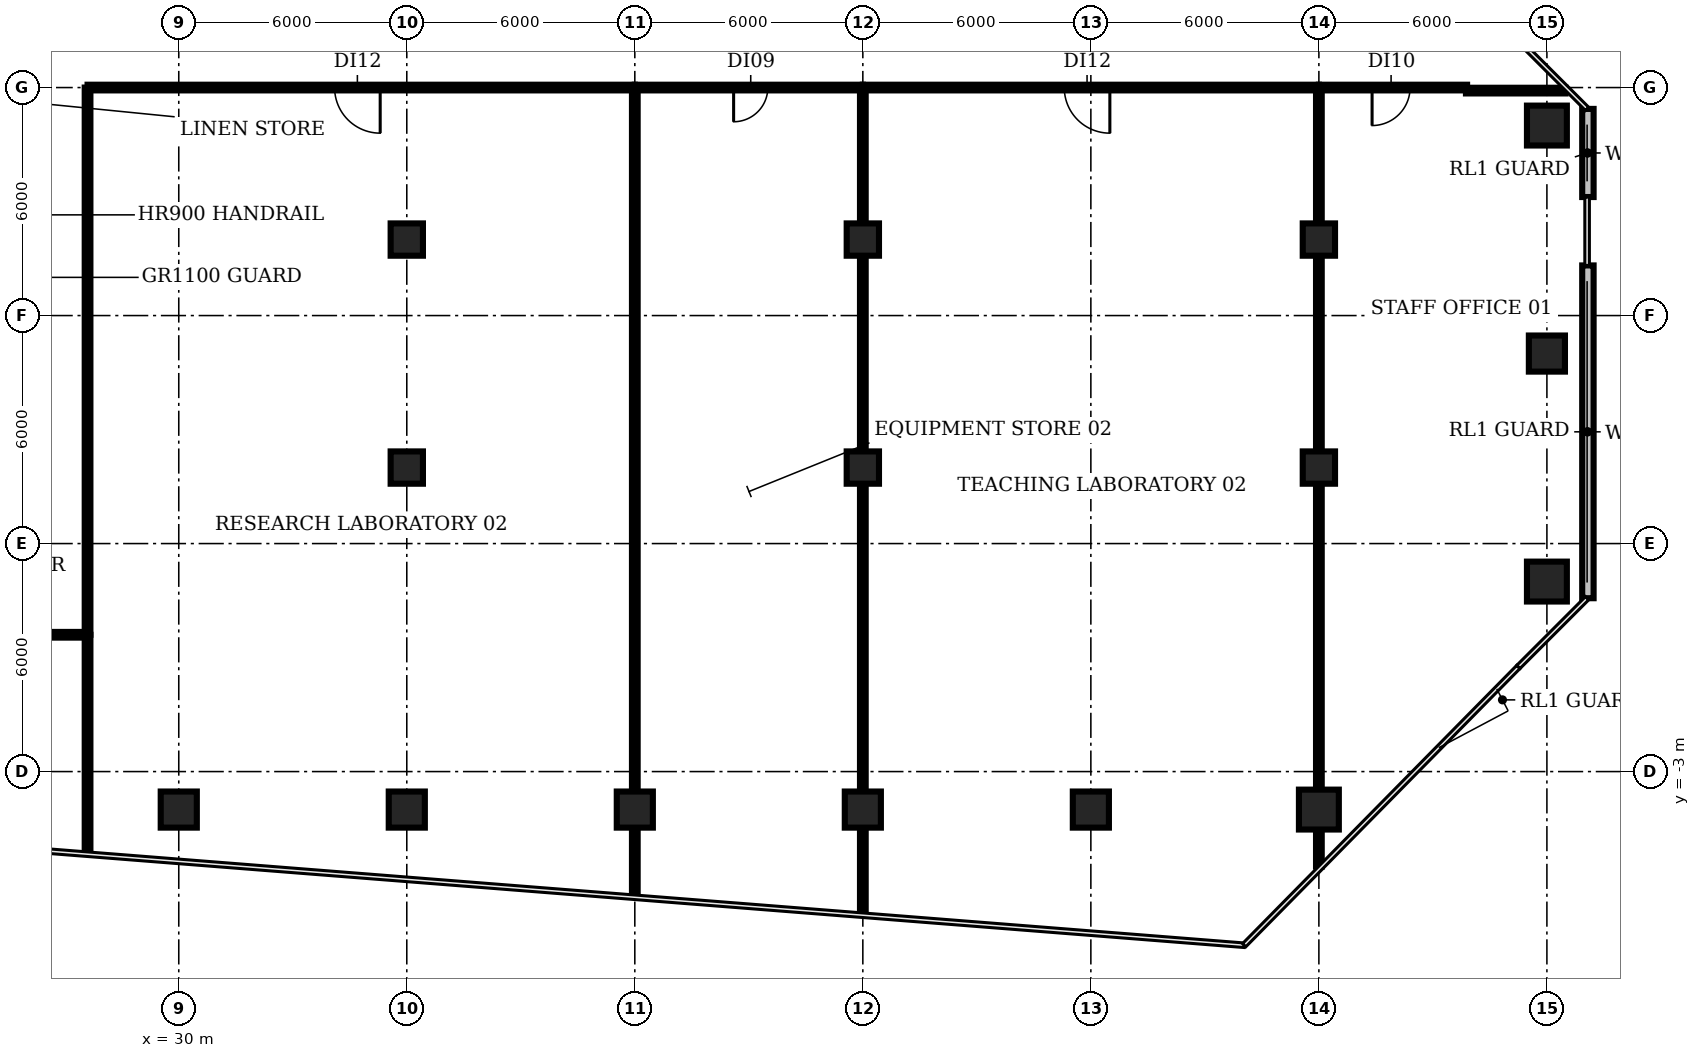
"""IFC4 building model, lengths in metres.
Left out: names, types, materials, properties, quantities, classifications, styles, units other than length and angle.
Written with IfcOpenShell. Run it as: python <this file> out.ifc"""

import sys

from ifc_helpers import new_model, si_unit, direction, frame, frame_2d, origin, origin_2d, place, context, subcontext, project, spatial, rectangle, circle, extrude, element, fill, save


model = new_model("IFC4")
c1 = context("Model", 3, precision=1e-05, world=origin(), true_north=direction((0.0, 1.0)))
c2 = subcontext(c1, "Body", "Model", "MODEL_VIEW")
j1 = project(units=[si_unit("LENGTHUNIT", "METRE"), si_unit("PLANEANGLEUNIT", "RADIAN")], contexts=[c1])
p1 = place(None, origin())
s1 = spatial("IfcSite", under=j1, at=p1, CompositionType="ELEMENT")
p2 = place(p1, origin())
s2 = spatial("IfcBuilding", under=s1, at=p2, CompositionType="ELEMENT")
p3 = place(p2, frame((0.0, 0.0, 33.2)))
s3 = spatial("IfcBuildingStorey", under=s2, at=p3, CompositionType="ELEMENT", Elevation=33.2)
for number, where, z_axis, x_axis in (
    (1, (30.0, -4.0, 0.0), (0.0, 0.0, 1.0), (1.0, 0.0, 0.0)),
    (2, (36.0, -4.0, 0.0), (0.0, 0.0, 1.0), (1.0, 0.0, 0.0)),
):
    element("IfcColumn", number, at=place(p3, frame(where, z_axis=z_axis, x_axis=x_axis)), inside=s3, PredefinedType="COLUMN", context=c2, shape_type="SweptSolid", body=[
        extrude(rectangle(XDim=0.95, YDim=0.95, at=origin_2d()), origin(), (0.0, 0.0, 1.0), 3.85),
    ])
for number, where, z_axis, x_axis in (
    (3, (36.0, 5.0, 0.0), (0.0, 0.0, 1.0), (1.0, 0.0, 0.0)),
    (4, (36.0, 11.0, 0.0), (0.0, 0.0, 1.0), (1.0, 0.0, 0.0)),
):
    element("IfcColumn", number, at=place(p3, frame(where, z_axis=z_axis, x_axis=x_axis)), inside=s3, PredefinedType="COLUMN", context=c2, shape_type="SweptSolid", body=[
        extrude(rectangle(XDim=0.85, YDim=0.85, at=origin_2d()), origin(), (0.0, 0.0, 1.0), 3.85),
    ])
for number, where, z_axis, x_axis in (
    (5, (42.0, -4.0, 0.0), (0.0, 0.0, 1.0), (1.0, 0.0, 0.0)),
    (6, (48.0, -4.0, 0.0), (0.0, 0.0, 1.0), (1.0, 0.0, 0.0)),
):
    element("IfcColumn", number, at=place(p3, frame(where, z_axis=z_axis, x_axis=x_axis)), inside=s3, PredefinedType="COLUMN", context=c2, shape_type="SweptSolid", body=[
        extrude(rectangle(XDim=0.95, YDim=0.95, at=origin_2d()), origin(), (0.0, 0.0, 1.0), 3.85),
    ])
for number, where, z_axis, x_axis in (
    (7, (48.0, 5.0, 0.0), (0.0, 0.0, 1.0), (1.0, 0.0, 0.0)),
    (8, (48.0, 11.0, 0.0), (0.0, 0.0, 1.0), (1.0, 0.0, 0.0)),
):
    element("IfcColumn", number, at=place(p3, frame(where, z_axis=z_axis, x_axis=x_axis)), inside=s3, PredefinedType="COLUMN", context=c2, shape_type="SweptSolid", body=[
        extrude(rectangle(XDim=0.85, YDim=0.85, at=origin_2d()), origin(), (0.0, 0.0, 1.0), 3.85),
    ])
p4 = place(p3, frame((54.0, -4.0, 0.0), z_axis=(0.0, 0.0, 1.0), x_axis=(1.0, 0.0, 0.0)))
e9 = element("IfcColumn", 9, at=p4, inside=s3, PredefinedType="COLUMN", context=c2, shape_type="SweptSolid", body=[
    extrude(rectangle(XDim=0.95, YDim=0.95, at=origin_2d()), origin(), (0.0, 0.0, 1.0), 3.85),
])
p5 = place(p3, frame((60.0, -4.0, 0.0), z_axis=(0.0, 0.0, 1.0), x_axis=(1.0, 0.0, 0.0)))
e10 = element("IfcColumn", 10, at=p5, inside=s3, PredefinedType="COLUMN", context=c2, shape_type="SweptSolid", body=[
    extrude(circle(Radius=0.525, at=origin_2d()), origin(), (0.0, 0.0, 1.0), 3.85),
])
for number, where, z_axis, x_axis in (
    (11, (60.0, 5.0, 0.0), (0.0, 0.0, 1.0), (1.0, 0.0, 0.0)),
    (12, (60.0, 11.0, 0.0), (0.0, 0.0, 1.0), (1.0, 0.0, 0.0)),
):
    element("IfcColumn", number, at=place(p3, frame(where, z_axis=z_axis, x_axis=x_axis)), inside=s3, PredefinedType="COLUMN", context=c2, shape_type="SweptSolid", body=[
        extrude(rectangle(XDim=0.85, YDim=0.85, at=origin_2d()), origin(), (0.0, 0.0, 1.0), 3.85),
    ])
p6 = place(p3, frame((66.0, 2.0, 0.0), z_axis=(0.0, 0.0, 1.0), x_axis=(1.0, 0.0, 0.0)))
e13 = element("IfcColumn", 13, at=p6, inside=s3, PredefinedType="COLUMN", context=c2, shape_type="SweptSolid", body=[
    extrude(circle(Radius=0.525, at=origin_2d()), origin(), (0.0, 0.0, 1.0), 3.85),
])
p7 = place(p3, frame((66.0, 8.0, 0.0), z_axis=(0.0, 0.0, 1.0), x_axis=(1.0, 0.0, 0.0)))
e14 = element("IfcColumn", 14, at=p7, inside=s3, PredefinedType="COLUMN", context=c2, shape_type="SweptSolid", body=[
    extrude(rectangle(XDim=0.95, YDim=0.95, at=origin_2d()), origin(), (0.0, 0.0, 1.0), 3.85),
])
p8 = place(p3, frame((66.0, 14.0, 0.0), z_axis=(0.0, 0.0, 1.0), x_axis=(1.0, 0.0, 0.0)))
e15 = element("IfcColumn", 15, at=p8, inside=s3, PredefinedType="COLUMN", context=c2, shape_type="SweptSolid", body=[
    extrude(circle(Radius=0.525, at=origin_2d()), origin(), (0.0, 0.0, 1.0), 3.85),
])
p9 = place(p3, frame((67.079, 1.562, 0.0), z_axis=(0.0, 0.0, 1.0), x_axis=(0.0, 1.0, 0.0)))
e16 = element("IfcWall", 16, at=p9, inside=s3, PredefinedType="SOLIDWALL", context=c2, shape_type="SweptSolid", body=[
    extrude(rectangle(XDim=8.757, YDim=0.3, at=frame_2d((4.379, 0.0))), origin(), (0.0, 0.0, 1.0), 3.85),
])
p10 = place(p3, frame((67.079, 12.119, 0.0), z_axis=(0.0, 0.0, 1.0), x_axis=(0.0, 1.0, 0.0)))
e17 = element("IfcWall", 17, at=p10, inside=s3, PredefinedType="SOLIDWALL", context=c2, shape_type="SweptSolid", body=[
    extrude(rectangle(XDim=2.319, YDim=0.3, at=frame_2d((1.16, 0.0))), origin(), (0.0, 0.0, 1.0), 3.85),
])
p11 = place(p3, frame((27.6, -5.12, 0.0), z_axis=(0.0, 0.0, 1.0), x_axis=(0.0, 1.0, 0.0)))
e18 = element("IfcWall", 18, at=p11, inside=s3, PredefinedType="PARTITIONING", context=c2, shape_type="SweptSolid", body=[
    extrude(rectangle(XDim=5.72, YDim=0.15, at=frame_2d((2.86, 0.0))), origin(), (0.0, 0.0, 1.0), 2.83),
])
p12 = place(p3, frame((27.6, 0.6, 0.0), z_axis=(0.0, 0.0, 1.0), x_axis=(-1.0, 0.0, 0.0)))
e19 = element("IfcWall", 19, at=p12, inside=s3, PredefinedType="PARTITIONING", context=c2, shape_type="SweptSolid", body=[
    extrude(rectangle(XDim=25.2, YDim=0.15, at=frame_2d((12.6, 0.0))), origin(), (0.0, 0.0, 1.0), 2.83),
])
p13 = place(p12, frame((12.1, 0.0, 0.0)))
e20 = element("IfcOpeningElement", 20, at=p13, cuts=e19, PredefinedType="OPENING", context=c2, shape_type="SweptSolid", body=[
    extrude(rectangle(XDim=1.2, YDim=2.1, at=frame_2d((0.6, 1.05))), frame((0.0, 0.085, 0.0), z_axis=(0.0, -1.0, 0.0), x_axis=(1.0, 0.0, 0.0)), (0.0, 0.0, 1.0), 0.17),
])
p14 = place(p3, frame((27.6, 0.6, 0.0), z_axis=(0.0, 0.0, 1.0), x_axis=(0.0, 1.0, 0.0)))
e21 = element("IfcWall", 21, at=p14, inside=s3, PredefinedType="PARTITIONING", context=c2, shape_type="SweptSolid", body=[
    extrude(rectangle(XDim=14.4, YDim=0.15, at=frame_2d((7.2, 0.0))), origin(), (0.0, 0.0, 1.0), 2.83),
])
p15 = place(p3, frame((42.0, -6.26, 0.0), z_axis=(0.0, 0.0, 1.0), x_axis=(0.0, 1.0, 0.0)))
e22 = element("IfcWall", 22, at=p15, inside=s3, PredefinedType="PARTITIONING", context=c2, shape_type="SweptSolid", body=[
    extrude(rectangle(XDim=21.26, YDim=0.15, at=frame_2d((10.63, 0.0))), origin(), (0.0, 0.0, 1.0), 2.83),
])
p16 = place(p3, frame((42.0, 15.0, 0.0), z_axis=(0.0, 0.0, 1.0), x_axis=(-1.0, 0.0, 0.0)))
e23 = element("IfcWall", 23, at=p16, inside=s3, PredefinedType="PARTITIONING", context=c2, shape_type="SweptSolid", body=[
    extrude(rectangle(XDim=14.4, YDim=0.15, at=frame_2d((7.2, 0.0))), origin(), (0.0, 0.0, 1.0), 2.83),
])
p17 = place(p16, frame((6.7, 0.0, 0.0)))
e24 = element("IfcOpeningElement", 24, at=p17, cuts=e23, PredefinedType="OPENING", context=c2, shape_type="SweptSolid", body=[
    extrude(rectangle(XDim=1.2, YDim=2.1, at=frame_2d((0.6, 1.05))), frame((0.0, 0.085, 0.0), z_axis=(0.0, -1.0, 0.0), x_axis=(1.0, 0.0, 0.0)), (0.0, 0.0, 1.0), 0.17),
])
p18 = place(p3, frame((48.0, -6.73, 0.0), z_axis=(0.0, 0.0, 1.0), x_axis=(0.0, 1.0, 0.0)))
e25 = element("IfcWall", 25, at=p18, inside=s3, PredefinedType="PARTITIONING", context=c2, shape_type="SweptSolid", body=[
    extrude(rectangle(XDim=21.73, YDim=0.15, at=frame_2d((10.865, 0.0))), origin(), (0.0, 0.0, 1.0), 2.83),
])
p19 = place(p3, frame((48.0, 15.0, 0.0), z_axis=(0.0, 0.0, 1.0), x_axis=(-1.0, 0.0, 0.0)))
e26 = element("IfcWall", 26, at=p19, inside=s3, PredefinedType="PARTITIONING", context=c2, shape_type="SweptSolid", body=[
    extrude(rectangle(XDim=6.0, YDim=0.15, at=frame_2d((3.0, 0.0))), origin(), (0.0, 0.0, 1.0), 2.83),
])
p20 = place(p19, frame((2.5, 0.0, 0.0)))
e27 = element("IfcOpeningElement", 27, at=p20, cuts=e26, PredefinedType="OPENING", context=c2, shape_type="SweptSolid", body=[
    extrude(rectangle(XDim=0.9, YDim=2.1, at=frame_2d((0.45, 1.05))), frame((0.0, 0.085, 0.0), z_axis=(0.0, -1.0, 0.0), x_axis=(1.0, 0.0, 0.0)), (0.0, 0.0, 1.0), 0.17),
])
p21 = place(p3, frame((60.0, -5.5, 0.0), z_axis=(0.0, 0.0, 1.0), x_axis=(0.0, 1.0, 0.0)))
e28 = element("IfcWall", 28, at=p21, inside=s3, PredefinedType="PARTITIONING", context=c2, shape_type="SweptSolid", body=[
    extrude(rectangle(XDim=20.5, YDim=0.15, at=frame_2d((10.25, 0.0))), origin(), (0.0, 0.0, 1.0), 2.83),
])
p22 = place(p3, frame((60.0, 15.0, 0.0), z_axis=(0.0, 0.0, 1.0), x_axis=(-1.0, 0.0, 0.0)))
e29 = element("IfcWall", 29, at=p22, inside=s3, PredefinedType="PARTITIONING", context=c2, shape_type="SweptSolid", body=[
    extrude(rectangle(XDim=12.0, YDim=0.15, at=frame_2d((6.0, 0.0))), origin(), (0.0, 0.0, 1.0), 2.83),
])
p23 = place(p22, frame((5.5, 0.0, 0.0)))
e30 = element("IfcOpeningElement", 30, at=p23, cuts=e29, PredefinedType="OPENING", context=c2, shape_type="SweptSolid", body=[
    extrude(rectangle(XDim=1.2, YDim=2.1, at=frame_2d((0.6, 1.05))), frame((0.0, 0.085, 0.0), z_axis=(0.0, -1.0, 0.0), x_axis=(1.0, 0.0, 0.0)), (0.0, 0.0, 1.0), 0.17),
])
p24 = place(p3, frame((63.87, 14.92, 0.0), z_axis=(0.0, 0.0, 1.0), x_axis=(1.0, 0.0, 0.0)))
e31 = element("IfcWall", 31, at=p24, inside=s3, PredefinedType="PARTITIONING", context=c2, shape_type="SweptSolid", body=[
    extrude(rectangle(XDim=2.621, YDim=0.15, at=frame_2d((1.311, 0.0))), origin(), (0.0, 0.0, 1.0), 2.83),
])
p25 = place(p3, frame((63.9, 15.0, 0.0), z_axis=(0.0, 0.0, 1.0), x_axis=(-1.0, 0.0, 0.0)))
e32 = element("IfcWall", 32, at=p25, inside=s3, PredefinedType="PARTITIONING", context=c2, shape_type="SweptSolid", body=[
    extrude(rectangle(XDim=3.9, YDim=0.15, at=frame_2d((1.95, 0.0))), origin(), (0.0, 0.0, 1.0), 2.83),
])
p26 = place(p25, frame((1.5, 0.0, 0.0)))
e33 = element("IfcOpeningElement", 33, at=p26, cuts=e32, PredefinedType="OPENING", context=c2, shape_type="SweptSolid", body=[
    extrude(rectangle(XDim=1.0, YDim=2.1, at=frame_2d((0.5, 1.05))), frame((0.0, 0.085, 0.0), z_axis=(0.0, -1.0, 0.0), x_axis=(1.0, 0.0, 0.0)), (0.0, 0.0, 1.0), 0.17),
])
p27 = place(p17, origin())
e34 = element("IfcDoor", 34, at=p27, inside=s3, OperationType="SINGLE_SWING_LEFT", PredefinedType="DOOR", context=c2, shape_type="SweptSolid", body=[
    extrude(rectangle(XDim=1.2, YDim=2.1, at=frame_2d((0.6, 1.05))), frame((0.0, 0.025, 0.0), z_axis=(0.0, -1.0, 0.0), x_axis=(1.0, 0.0, 0.0)), (0.0, 0.0, 1.0), 0.05),
])
fill(e24, e34)
p28 = place(p20, origin())
e35 = element("IfcDoor", 35, at=p28, inside=s3, OperationType="SINGLE_SWING_RIGHT", PredefinedType="DOOR", context=c2, shape_type="SweptSolid", body=[
    extrude(rectangle(XDim=0.9, YDim=2.1, at=frame_2d((0.45, 1.05))), frame((0.0, 0.025, 0.0), z_axis=(0.0, -1.0, 0.0), x_axis=(1.0, 0.0, 0.0)), (0.0, 0.0, 1.0), 0.05),
])
fill(e27, e35)
p29 = place(p23, origin())
e36 = element("IfcDoor", 36, at=p29, inside=s3, OperationType="SINGLE_SWING_LEFT", PredefinedType="DOOR", context=c2, shape_type="SweptSolid", body=[
    extrude(rectangle(XDim=1.2, YDim=2.1, at=frame_2d((0.6, 1.05))), frame((0.0, 0.025, 0.0), z_axis=(0.0, -1.0, 0.0), x_axis=(1.0, 0.0, 0.0)), (0.0, 0.0, 1.0), 0.05),
])
fill(e30, e36)
p30 = place(p26, origin())
e37 = element("IfcDoor", 37, at=p30, inside=s3, OperationType="SINGLE_SWING_RIGHT", PredefinedType="DOOR", context=c2, shape_type="SweptSolid", body=[
    extrude(rectangle(XDim=1.0, YDim=2.1, at=frame_2d((0.5, 1.05))), frame((0.0, 0.025, 0.0), z_axis=(0.0, -1.0, 0.0), x_axis=(1.0, 0.0, 0.0)), (0.0, 0.0, 1.0), 0.05),
])
fill(e33, e37)
save(model, sys.argv[1])
